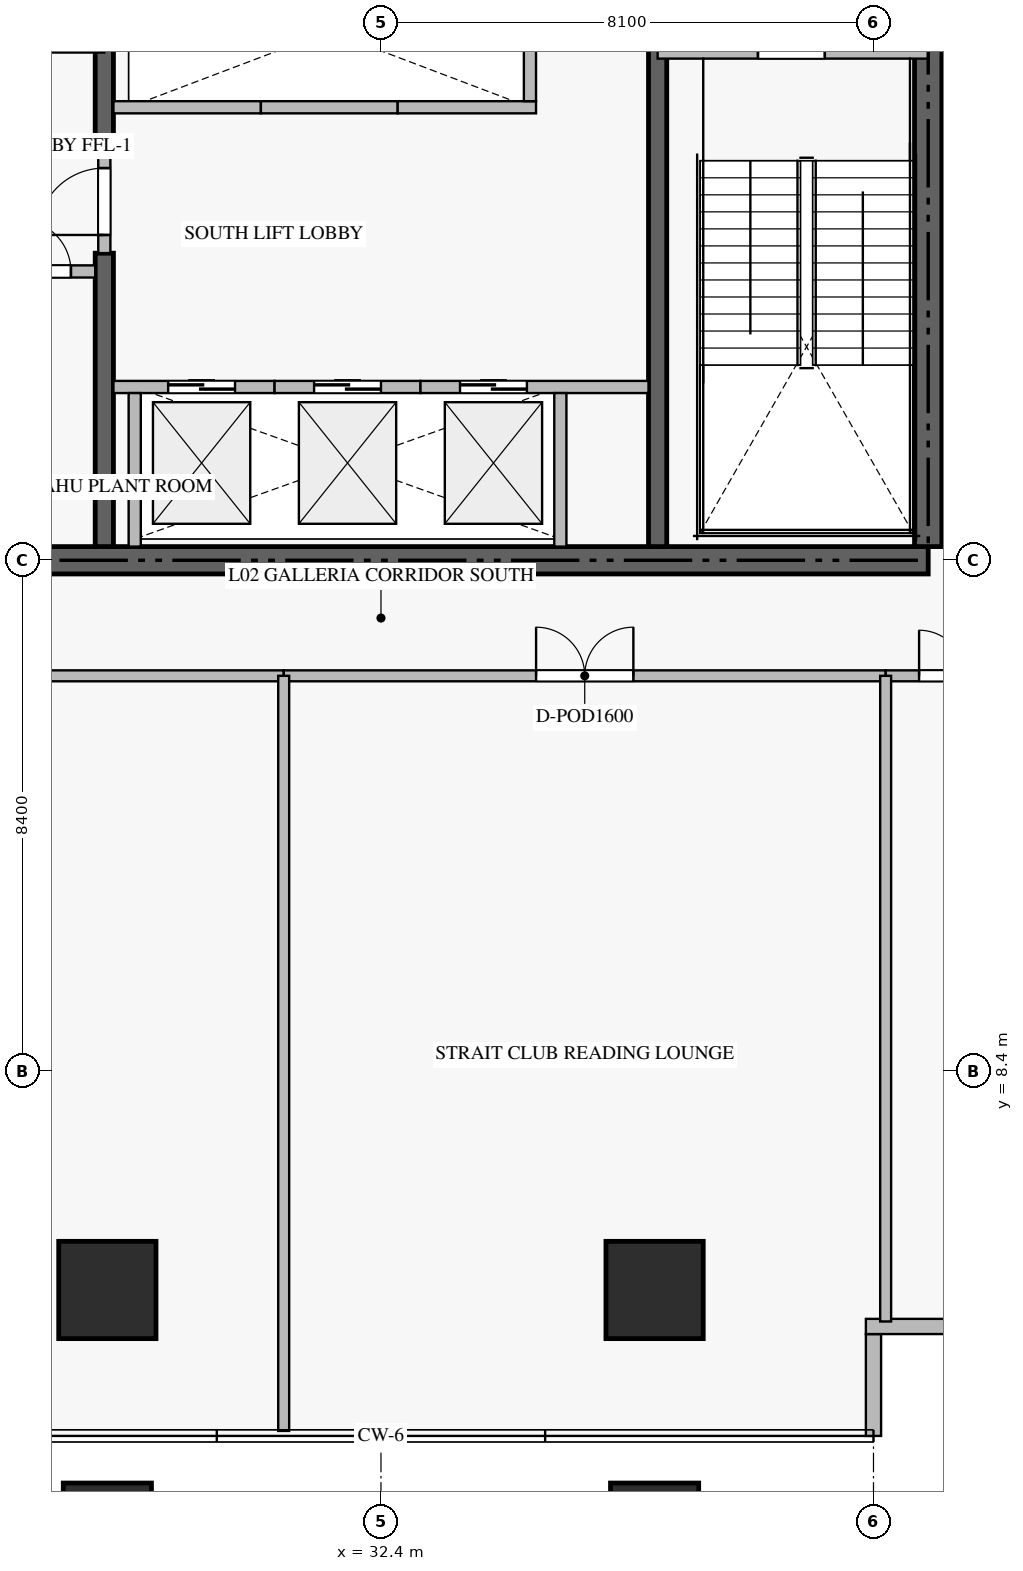
"""IFC4 building model, lengths in metres.
Left out: names, types, materials, properties, quantities, classifications, styles, units other than length and angle.
Written with IfcOpenShell. Run it as: python <this file> out.ifc"""

import sys

from ifc_helpers import new_model, si_unit, direction, frame, frame_2d, origin, origin_2d, place, context, subcontext, project, spatial, rectangle, extrude, source, transform, mapped, element, fill, save


model = new_model("IFC4")
c1 = context("Model", 3, precision=1e-05, world=origin(), true_north=direction((0.0, 1.0)))
c2 = subcontext(c1, "Body", "Model", "MODEL_VIEW")
j1 = project(units=[si_unit("LENGTHUNIT", "METRE"), si_unit("PLANEANGLEUNIT", "RADIAN")], contexts=[c1])
p1 = place(None, origin())
s1 = spatial("IfcSite", under=j1, at=p1, CompositionType="ELEMENT")
p2 = place(p1, origin())
s2 = spatial("IfcBuilding", under=s1, at=p2, CompositionType="ELEMENT")
p3 = place(p2, frame((0.0, 0.0, 10.5)))
s3 = spatial("IfcBuildingStorey", under=s2, at=p3, CompositionType="ELEMENT", Elevation=10.5)
p4 = place(p3, frame((23.4, 16.8, -0.38), z_axis=(0.0, 0.0, 1.0), x_axis=(1.0, 0.0, 0.0)))
e1 = element("IfcWall", 1, at=p4, inside=s3, PredefinedType="SHEAR", context=c2, shape_type="SweptSolid", body=[
    extrude(rectangle(XDim=18.0, YDim=0.45, at=frame_2d((9.0, 0.0))), origin(), (0.0, 0.0, 1.0), 4.798),
])
p5 = place(p3, frame((41.4, 17.025, -0.38), z_axis=(0.0, 0.0, 1.0), x_axis=(0.0, 1.0, 0.0)))
e2 = element("IfcWall", 2, at=p5, inside=s3, PredefinedType="SHEAR", context=c2, shape_type="SweptSolid", body=[
    extrude(rectangle(XDim=8.325, YDim=0.45, at=frame_2d((4.163, 0.0))), origin(), (0.0, 0.0, 1.0), 4.798),
])
p6 = place(p3, frame((27.85, 17.025, -0.38), z_axis=(0.0, 0.0, 1.0), x_axis=(0.0, 1.0, 0.0)))
e3 = element("IfcWall", 3, at=p6, inside=s3, PredefinedType="SHEAR", context=c2, shape_type="SweptSolid", body=[
    extrude(rectangle(XDim=4.825, YDim=0.3, at=frame_2d((2.413, 0.0))), origin(), (0.0, 0.0, 1.0), 4.798),
])
p7 = place(p3, frame((27.85, 23.55, -0.38), z_axis=(0.0, 0.0, 1.0), x_axis=(0.0, 1.0, 0.0)))
e4 = element("IfcWall", 4, at=p7, inside=s3, PredefinedType="SHEAR", context=c2, shape_type="SweptSolid", body=[
    extrude(rectangle(XDim=9.825, YDim=0.3, at=frame_2d((4.913, 0.0))), origin(), (0.0, 0.0, 1.0), 4.798),
])
p8 = place(p3, frame((36.95, 17.025, -0.38), z_axis=(0.0, 0.0, 1.0), x_axis=(0.0, 1.0, 0.0)))
e5 = element("IfcWall", 5, at=p8, inside=s3, PredefinedType="SHEAR", context=c2, shape_type="SweptSolid", body=[
    extrude(rectangle(XDim=8.325, YDim=0.3, at=frame_2d((4.163, 0.0))), origin(), (0.0, 0.0, 1.0), 4.798),
])
m1 = source(origin(), c2, "Body", "SweptSolid", [
    extrude(rectangle(XDim=1.6, YDim=1.6, at=origin_2d()), origin(), (0.0, 0.0, 1.0), 4.8),
])
for number, where, z_axis, x_axis in (
    (6, (27.9, 4.8, -0.38), (0.0, 0.0, 1.0), (1.0, 0.0, 0.0)),
    (7, (36.9, 4.8, -0.38), (0.0, 0.0, 1.0), (1.0, 0.0, 0.0)),
):
    element("IfcColumn", number, at=place(p3, frame(where, z_axis=z_axis, x_axis=x_axis)), inside=s3, PredefinedType="COLUMN", context=c2, shape_type="MappedRepresentation", body=[
        mapped(m1, transform((0.0, 0.0, 0.0), scale=1.0)),
    ])
m2 = source(origin(), c2, "Body", "SweptSolid", [
    extrude(rectangle(XDim=1.45, YDim=1.45, at=origin_2d()), origin(), (0.0, 0.0, 1.0), 4.8),
])
for number, where, z_axis, x_axis in (
    (8, (27.9, 0.9, -0.38), (0.0, 0.0, 1.0), (1.0, 0.0, 0.0)),
    (9, (36.9, 0.9, -0.38), (0.0, 0.0, 1.0), (1.0, 0.0, 0.0)),
):
    element("IfcColumn", number, at=place(p3, frame(where, z_axis=z_axis, x_axis=x_axis)), inside=s3, PredefinedType="COLUMN", context=c2, shape_type="MappedRepresentation", body=[
        mapped(m2, transform((0.0, 0.0, 0.0), scale=1.0)),
    ])
p9 = place(p3, frame((40.5, 2.4, 0.0), z_axis=(0.0, 0.0, 1.0), x_axis=(0.0, 1.0, 0.0)))
e10 = element("IfcWall", 10, at=p9, inside=s3, PredefinedType="ELEMENTEDWALL", context=c2, shape_type="SweptSolid", body=[
    extrude(rectangle(XDim=1.675, YDim=0.25, at=frame_2d((0.837, 0.0))), origin(), (0.0, 0.0, 1.0), 4.405),
])
p10 = place(p3, frame((40.375, 4.2, 0.0), z_axis=(0.0, 0.0, 1.0), x_axis=(1.0, 0.0, 0.0)))
e11 = element("IfcWall", 11, at=p10, inside=s3, PredefinedType="ELEMENTEDWALL", context=c2, shape_type="SweptSolid", body=[
    extrude(rectangle(XDim=24.55, YDim=0.25, at=frame_2d((12.275, 0.0))), origin(), (0.0, 0.0, 1.0), 4.405),
])
p11 = place(p10, frame((6.202, 0.0, 0.6)))
e12 = element("IfcOpeningElement", 12, at=p11, cuts=e11, PredefinedType="OPENING", context=c2, shape_type="SweptSolid", body=[
    extrude(rectangle(XDim=2.4, YDim=2.6, at=frame_2d((1.2, 1.3))), frame((0.0, 0.135, 0.0), z_axis=(0.0, -1.0, 0.0), x_axis=(1.0, 0.0, 0.0)), (0.0, 0.0, 1.0), 0.27),
])
p12 = place(p10, frame((13.733, 0.0, 0.6)))
e13 = element("IfcOpeningElement", 13, at=p12, cuts=e11, PredefinedType="OPENING", context=c2, shape_type="SweptSolid", body=[
    extrude(rectangle(XDim=2.4, YDim=2.6, at=frame_2d((1.2, 1.3))), frame((0.0, 0.135, 0.0), z_axis=(0.0, -1.0, 0.0), x_axis=(1.0, 0.0, 0.0)), (0.0, 0.0, 1.0), 0.27),
])
p13 = place(p3, frame((36.95, 25.15, 0.0), z_axis=(0.0, 0.0, 1.0), x_axis=(1.0, 0.0, 0.0)))
e14 = element("IfcWall", 14, at=p13, inside=s3, PredefinedType="STANDARD", context=c2, shape_type="SweptSolid", body=[
    extrude(rectangle(XDim=4.45, YDim=0.2, at=frame_2d((2.225, 0.0))), origin(), (0.0, 0.0, 1.0), 4.42),
])
p14 = place(p13, frame((1.65, 0.0, 0.0)))
e15 = element("IfcOpeningElement", 15, at=p14, cuts=e14, PredefinedType="OPENING", context=c2, shape_type="SweptSolid", body=[
    extrude(rectangle(XDim=1.1, YDim=2.15, at=frame_2d((0.55, 1.075))), frame((0.0, 0.11, 0.0), z_axis=(0.0, -1.0, 0.0), x_axis=(1.0, 0.0, 0.0)), (0.0, 0.0, 1.0), 0.22),
])
p15 = place(p3, frame((28.0, 19.65, 0.0), z_axis=(0.0, 0.0, 1.0), x_axis=(1.0, 0.0, 0.0)))
e16 = element("IfcWall", 16, at=p15, inside=s3, PredefinedType="STANDARD", context=c2, shape_type="SweptSolid", body=[
    extrude(rectangle(XDim=2.65, YDim=0.2, at=frame_2d((1.325, 0.0))), origin(), (0.0, 0.0, 1.0), 4.42),
])
p16 = place(p15, frame((0.9, 0.0, 0.0)))
e17 = element("IfcOpeningElement", 17, at=p16, cuts=e16, PredefinedType="OPENING", context=c2, shape_type="SweptSolid", body=[
    extrude(rectangle(XDim=1.1, YDim=2.2, at=frame_2d((0.55, 1.1))), frame((0.0, 0.11, 0.0), z_axis=(0.0, -1.0, 0.0), x_axis=(1.0, 0.0, 0.0)), (0.0, 0.0, 1.0), 0.22),
])
p17 = place(p3, frame((28.35, 17.025, 0.0), z_axis=(0.0, 0.0, 1.0), x_axis=(0.0, 1.0, 0.0)))
e18 = element("IfcWall", 18, at=p17, inside=s3, PredefinedType="STANDARD", context=c2, shape_type="SweptSolid", body=[
    extrude(rectangle(XDim=2.525, YDim=0.2, at=frame_2d((1.263, 0.0))), origin(), (0.0, 0.0, 1.0), 4.42),
])
p18 = place(p3, frame((30.65, 19.65, 0.0), z_axis=(0.0, 0.0, 1.0), x_axis=(1.0, 0.0, 0.0)))
e19 = element("IfcWall", 19, at=p18, inside=s3, PredefinedType="STANDARD", context=c2, shape_type="SweptSolid", body=[
    extrude(rectangle(XDim=2.4, YDim=0.2, at=frame_2d((1.2, 0.0))), origin(), (0.0, 0.0, 1.0), 4.42),
])
p19 = place(p18, frame((0.65, 0.0, 0.0)))
e20 = element("IfcOpeningElement", 20, at=p19, cuts=e19, PredefinedType="OPENING", context=c2, shape_type="SweptSolid", body=[
    extrude(rectangle(XDim=1.1, YDim=2.2, at=frame_2d((0.55, 1.1))), frame((0.0, 0.11, 0.0), z_axis=(0.0, -1.0, 0.0), x_axis=(1.0, 0.0, 0.0)), (0.0, 0.0, 1.0), 0.22),
])
p20 = place(p3, frame((33.05, 19.65, 0.0), z_axis=(0.0, 0.0, 1.0), x_axis=(1.0, 0.0, 0.0)))
e21 = element("IfcWall", 21, at=p20, inside=s3, PredefinedType="STANDARD", context=c2, shape_type="SweptSolid", body=[
    extrude(rectangle(XDim=3.75, YDim=0.2, at=frame_2d((1.875, 0.0))), origin(), (0.0, 0.0, 1.0), 4.42),
])
p21 = place(p20, frame((0.65, 0.0, 0.0)))
e22 = element("IfcOpeningElement", 22, at=p21, cuts=e21, PredefinedType="OPENING", context=c2, shape_type="SweptSolid", body=[
    extrude(rectangle(XDim=1.1, YDim=2.2, at=frame_2d((0.55, 1.1))), frame((0.0, 0.11, 0.0), z_axis=(0.0, -1.0, 0.0), x_axis=(1.0, 0.0, 0.0)), (0.0, 0.0, 1.0), 0.22),
])
p22 = place(p3, frame((35.35, 17.025, 0.0), z_axis=(0.0, 0.0, 1.0), x_axis=(0.0, 1.0, 0.0)))
e23 = element("IfcWall", 23, at=p22, inside=s3, PredefinedType="STANDARD", context=c2, shape_type="SweptSolid", body=[
    extrude(rectangle(XDim=2.525, YDim=0.2, at=frame_2d((1.263, 0.0))), origin(), (0.0, 0.0, 1.0), 4.42),
])
p23 = place(p3, frame((28.0, 24.25, 0.0), z_axis=(0.0, 0.0, 1.0), x_axis=(1.0, 0.0, 0.0)))
e24 = element("IfcWall", 24, at=p23, inside=s3, PredefinedType="STANDARD", context=c2, shape_type="SweptSolid", body=[
    extrude(rectangle(XDim=2.425, YDim=0.2, at=frame_2d((1.212, 0.0))), origin(), (0.0, 0.0, 1.0), 4.42),
])
p24 = place(p3, frame((30.425, 24.25, 0.0), z_axis=(0.0, 0.0, 1.0), x_axis=(1.0, 0.0, 0.0)))
e25 = element("IfcWall", 25, at=p24, inside=s3, PredefinedType="STANDARD", context=c2, shape_type="SweptSolid", body=[
    extrude(rectangle(XDim=2.25, YDim=0.2, at=frame_2d((1.125, 0.0))), origin(), (0.0, 0.0, 1.0), 4.42),
])
p25 = place(p3, frame((32.675, 24.25, 0.0), z_axis=(0.0, 0.0, 1.0), x_axis=(1.0, 0.0, 0.0)))
e26 = element("IfcWall", 26, at=p25, inside=s3, PredefinedType="STANDARD", context=c2, shape_type="SweptSolid", body=[
    extrude(rectangle(XDim=2.275, YDim=0.2, at=frame_2d((1.137, 0.0))), origin(), (0.0, 0.0, 1.0), 4.42),
])
p26 = place(p3, frame((34.85, 24.35, 0.0), z_axis=(0.0, 0.0, 1.0), x_axis=(0.0, 1.0, 0.0)))
e27 = element("IfcWall", 27, at=p26, inside=s3, PredefinedType="STANDARD", context=c2, shape_type="SweptSolid", body=[
    extrude(rectangle(XDim=2.5, YDim=0.2, at=frame_2d((1.25, 0.0))), origin(), (0.0, 0.0, 1.0), 4.42),
])
p27 = place(p3, frame((26.052, 21.55, 0.0), z_axis=(0.0, 0.0, 1.0), x_axis=(1.0, 0.0, 0.0)))
e28 = element("IfcWall", 28, at=p27, inside=s3, PredefinedType="STANDARD", context=c2, shape_type="SweptSolid", body=[
    extrude(rectangle(XDim=1.648, YDim=0.2, at=frame_2d((0.824, 0.0))), origin(), (0.0, 0.0, 1.0), 4.42),
])
p28 = place(p27, frame((0.399, 0.0, 0.0)))
e29 = element("IfcOpeningElement", 29, at=p28, cuts=e28, PredefinedType="OPENING", context=c2, shape_type="SweptSolid", body=[
    extrude(rectangle(XDim=0.85, YDim=2.1, at=frame_2d((0.425, 1.05))), frame((0.0, 0.11, 0.0), z_axis=(0.0, -1.0, 0.0), x_axis=(1.0, 0.0, 0.0)), (0.0, 0.0, 1.0), 0.22),
])
p29 = place(p3, frame((27.85, 21.852, 0.0), z_axis=(0.0, 0.0, 1.0), x_axis=(0.0, 1.0, 0.0)))
e30 = element("IfcWall", 30, at=p29, inside=s3, PredefinedType="STANDARD", context=c2, shape_type="SweptSolid", body=[
    extrude(rectangle(XDim=1.696, YDim=0.2, at=frame_2d((0.848, 0.0))), origin(), (0.0, 0.0, 1.0), 4.42),
])
p30 = place(p29, frame((0.298, 0.0, 0.0)))
e31 = element("IfcOpeningElement", 31, at=p30, cuts=e30, PredefinedType="OPENING", context=c2, shape_type="SweptSolid", body=[
    extrude(rectangle(XDim=1.1, YDim=2.15, at=frame_2d((0.55, 1.075))), frame((0.0, 0.11, 0.0), z_axis=(0.0, -1.0, 0.0), x_axis=(1.0, 0.0, 0.0)), (0.0, 0.0, 1.0), 0.22),
])
p31 = place(p3, frame((21.502, 14.9, 0.0), z_axis=(0.0, 0.0, 1.0), x_axis=(1.0, 0.0, 0.0)))
e32 = element("IfcWall", 32, at=p31, inside=s3, PredefinedType="PARTITIONING", context=c2, shape_type="SweptSolid", body=[
    extrude(rectangle(XDim=9.298, YDim=0.18, at=frame_2d((4.649, 0.0))), origin(), (0.0, 0.0, 1.0), 4.42),
])
p32 = place(p31, frame((3.899, 0.0, 0.0)))
e33 = element("IfcOpeningElement", 33, at=p32, cuts=e32, PredefinedType="OPENING", context=c2, shape_type="SweptSolid", body=[
    extrude(rectangle(XDim=1.5, YDim=2.25, at=frame_2d((0.75, 1.125))), frame((0.0, 0.1, 0.0), z_axis=(0.0, -1.0, 0.0), x_axis=(1.0, 0.0, 0.0)), (0.0, 0.0, 1.0), 0.2),
])
p33 = place(p3, frame((30.802, 14.9, 0.0), z_axis=(0.0, 0.0, 1.0), x_axis=(1.0, 0.0, 0.0)))
e34 = element("IfcWall", 34, at=p33, inside=s3, PredefinedType="PARTITIONING", context=c2, shape_type="SweptSolid", body=[
    extrude(rectangle(XDim=9.898, YDim=0.18, at=frame_2d((4.949, 0.0))), origin(), (0.0, 0.0, 1.0), 4.42),
])
p34 = place(p33, frame((4.149, 0.0, 0.0)))
e35 = element("IfcOpeningElement", 35, at=p34, cuts=e34, PredefinedType="OPENING", context=c2, shape_type="SweptSolid", body=[
    extrude(rectangle(XDim=1.6, YDim=2.3, at=frame_2d((0.8, 1.15))), frame((0.0, 0.1, 0.0), z_axis=(0.0, -1.0, 0.0), x_axis=(1.0, 0.0, 0.0)), (0.0, 0.0, 1.0), 0.2),
])
p35 = place(p3, frame((40.702, 14.9, 0.0), z_axis=(0.0, 0.0, 1.0), x_axis=(1.0, 0.0, 0.0)))
e36 = element("IfcWall", 36, at=p35, inside=s3, PredefinedType="PARTITIONING", context=c2, shape_type="SweptSolid", body=[
    extrude(rectangle(XDim=2.596, YDim=0.18, at=frame_2d((1.298, 0.0))), origin(), (0.0, 0.0, 1.0), 4.42),
])
p36 = place(p35, frame((0.548, 0.0, 0.0)))
e37 = element("IfcOpeningElement", 37, at=p36, cuts=e36, PredefinedType="OPENING", context=c2, shape_type="SweptSolid", body=[
    extrude(rectangle(XDim=1.5, YDim=2.25, at=frame_2d((0.75, 1.125))), frame((0.0, 0.1, 0.0), z_axis=(0.0, -1.0, 0.0), x_axis=(1.0, 0.0, 0.0)), (0.0, 0.0, 1.0), 0.2),
])
p37 = place(p3, frame((30.8, 2.482, 0.0), z_axis=(0.0, 0.0, 1.0), x_axis=(0.0, 1.0, 0.0)))
e38 = element("IfcWall", 38, at=p37, inside=s3, PredefinedType="PARTITIONING", context=c2, shape_type="SweptSolid", body=[
    extrude(rectangle(XDim=12.418, YDim=0.18, at=frame_2d((6.209, 0.0))), origin(), (0.0, 0.0, 1.0), 4.42),
])
p38 = place(p3, frame((40.7, 4.282, 0.0), z_axis=(0.0, 0.0, 1.0), x_axis=(0.0, 1.0, 0.0)))
e39 = element("IfcWall", 39, at=p38, inside=s3, PredefinedType="PARTITIONING", context=c2, shape_type="SweptSolid", body=[
    extrude(rectangle(XDim=10.618, YDim=0.18, at=frame_2d((5.309, 0.0))), origin(), (0.0, 0.0, 1.0), 4.42),
])
m3 = source(origin(), c2, "Body", "SweptSolid", [
    extrude(rectangle(XDim=1.1, YDim=2.15, at=frame_2d((0.55, 1.075))), frame((0.0, 0.025, 0.0), z_axis=(0.0, -1.0, 0.0), x_axis=(1.0, 0.0, 0.0)), (0.0, 0.0, 1.0), 0.05),
])
p39 = place(p14, origin())
e40 = element("IfcDoor", 40, at=p39, inside=s3, OperationType="SINGLE_SWING_LEFT", PredefinedType="DOOR", context=c2, shape_type="MappedRepresentation", body=[
    mapped(m3, transform((0.0, 0.0, 0.0), scale=1.0)),
])
fill(e15, e40)
m4 = source(origin(), c2, "Body", "SweptSolid", [
    extrude(rectangle(XDim=1.1, YDim=2.2, at=frame_2d((0.55, 1.1))), frame((0.0, 0.025, 0.0), z_axis=(0.0, -1.0, 0.0), x_axis=(1.0, 0.0, 0.0)), (0.0, 0.0, 1.0), 0.05),
])
p40 = place(p16, origin())
e41 = element("IfcDoor", 41, at=p40, inside=s3, OperationType="DOUBLE_DOOR_SLIDING", PredefinedType="DOOR", context=c2, shape_type="MappedRepresentation", body=[
    mapped(m4, transform((0.0, 0.0, 0.0), scale=1.0)),
])
fill(e17, e41)
p41 = place(p19, origin())
e42 = element("IfcDoor", 42, at=p41, inside=s3, OperationType="DOUBLE_DOOR_SLIDING", PredefinedType="DOOR", context=c2, shape_type="MappedRepresentation", body=[
    mapped(m4, transform((0.0, 0.0, 0.0), scale=1.0)),
])
fill(e20, e42)
p42 = place(p21, origin())
e43 = element("IfcDoor", 43, at=p42, inside=s3, OperationType="DOUBLE_DOOR_SLIDING", PredefinedType="DOOR", context=c2, shape_type="MappedRepresentation", body=[
    mapped(m4, transform((0.0, 0.0, 0.0), scale=1.0)),
])
fill(e22, e43)
m5 = source(origin(), c2, "Body", "SweptSolid", [
    extrude(rectangle(XDim=0.85, YDim=2.1, at=frame_2d((0.425, 1.05))), frame((0.0, 0.025, 0.0), z_axis=(0.0, -1.0, 0.0), x_axis=(1.0, 0.0, 0.0)), (0.0, 0.0, 1.0), 0.05),
])
p43 = place(p28, origin())
e44 = element("IfcDoor", 44, at=p43, inside=s3, OperationType="SINGLE_SWING_LEFT", PredefinedType="DOOR", context=c2, shape_type="MappedRepresentation", body=[
    mapped(m5, transform((0.0, 0.0, 0.0), scale=1.0)),
])
fill(e29, e44)
p44 = place(p30, origin())
e45 = element("IfcDoor", 45, at=p44, inside=s3, OperationType="SINGLE_SWING_LEFT", PredefinedType="DOOR", context=c2, shape_type="MappedRepresentation", body=[
    mapped(m3, transform((0.0, 0.0, 0.0), scale=1.0)),
])
fill(e31, e45)
m6 = source(origin(), c2, "Body", "SweptSolid", [
    extrude(rectangle(XDim=1.6, YDim=2.3, at=frame_2d((0.8, 1.15))), frame((0.0, 0.025, 0.0), z_axis=(0.0, -1.0, 0.0), x_axis=(1.0, 0.0, 0.0)), (0.0, 0.0, 1.0), 0.05),
])
p45 = place(p34, origin())
e46 = element("IfcDoor", 46, at=p45, inside=s3, OperationType="DOUBLE_DOOR_SINGLE_SWING", PredefinedType="DOOR", context=c2, shape_type="MappedRepresentation", body=[
    mapped(m6, transform((0.0, 0.0, 0.0), scale=1.0)),
])
fill(e35, e46)
m7 = source(origin(), c2, "Body", "SweptSolid", [
    extrude(rectangle(XDim=1.5, YDim=2.25, at=frame_2d((0.75, 1.125))), frame((0.0, 0.025, 0.0), z_axis=(0.0, -1.0, 0.0), x_axis=(1.0, 0.0, 0.0)), (0.0, 0.0, 1.0), 0.05),
])
p46 = place(p36, origin())
e47 = element("IfcDoor", 47, at=p46, inside=s3, OperationType="DOUBLE_DOOR_SINGLE_SWING", PredefinedType="DOOR", context=c2, shape_type="MappedRepresentation", body=[
    mapped(m7, transform((0.0, 0.0, 0.0), scale=1.0)),
])
fill(e37, e47)
save(model, sys.argv[1])
